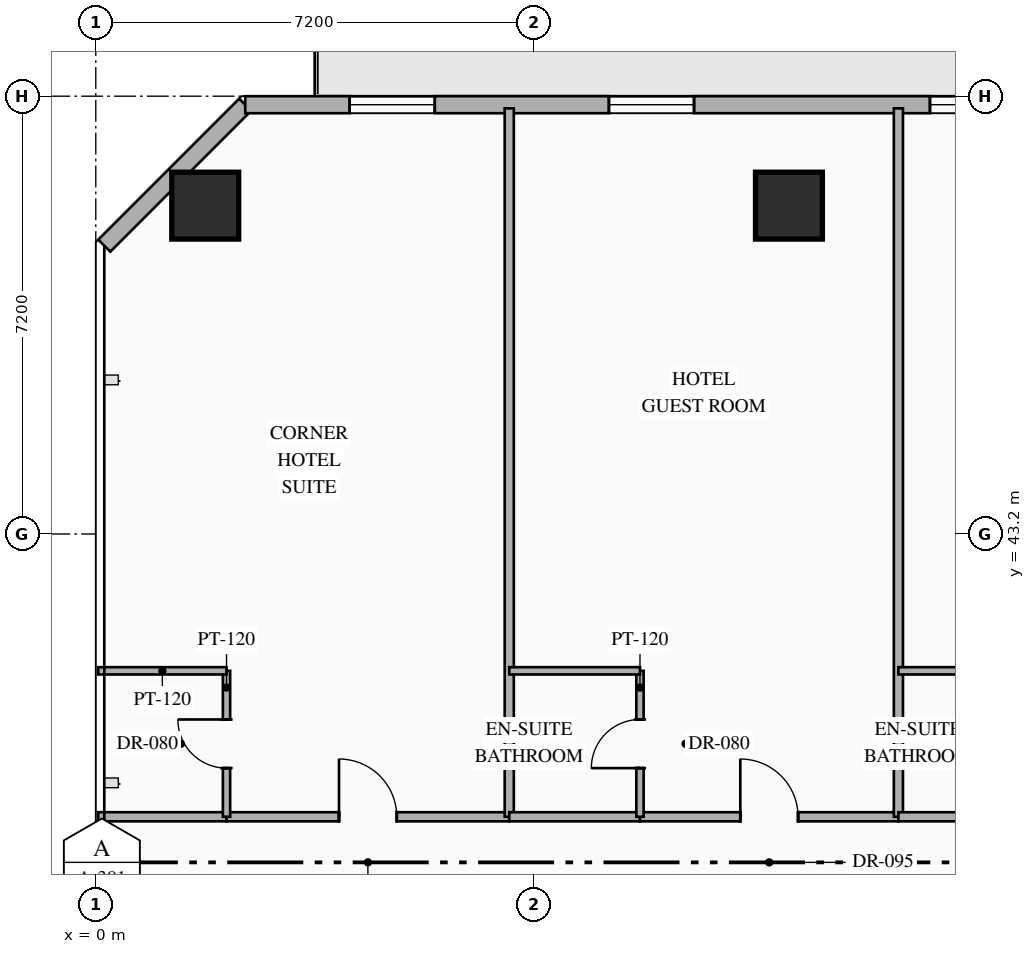
"""IFC4 building model, lengths in metres.
Left out: names, types, materials, properties, quantities, classifications, styles, units other than length and angle.
Written with IfcOpenShell. Run it as: python <this file> out.ifc"""

import sys

from ifc_helpers import new_model, si_unit, direction, frame, frame_2d, origin, origin_2d, place, context, subcontext, project, spatial, rectangle, hollow_rectangle, extrude, element, fill, save


model = new_model("IFC4")
c1 = context("Model", 3, precision=1e-05, world=origin(), true_north=direction((0.0, 1.0)))
c2 = subcontext(c1, "Body", "Model", "MODEL_VIEW")
j1 = project(units=[si_unit("LENGTHUNIT", "METRE"), si_unit("PLANEANGLEUNIT", "RADIAN")], contexts=[c1])
p1 = place(None, origin())
s1 = spatial("IfcSite", under=j1, at=p1, CompositionType="ELEMENT")
p2 = place(p1, origin())
s2 = spatial("IfcBuilding", under=s1, at=p2, CompositionType="ELEMENT")
p3 = place(p2, frame((0.0, 0.0, 50.0)))
s3 = spatial("IfcBuildingStorey", under=s2, at=p3, CompositionType="ELEMENT", Elevation=50.0)
for number, where, z_axis, x_axis in (
    (1, (1.8, 48.6, 0.0), (0.0, 0.0, 1.0), (1.0, 0.0, 0.0)),
    (2, (11.4, 48.6, 0.0), (0.0, 0.0, 1.0), (1.0, 0.0, 0.0)),
):
    element("IfcColumn", number, at=place(p3, frame(where, z_axis=z_axis, x_axis=x_axis)), inside=s3, PredefinedType="COLUMN", context=c2, shape_type="SweptSolid", body=[
        extrude(hollow_rectangle(XDim=1.1, YDim=1.1, WallThickness=0.04, at=origin_2d()), origin(), (0.0, 0.0, 1.0), 3.35),
    ])
p4 = place(p3, frame((0.14, 47.942, 0.0), z_axis=(0.0, 0.0, 1.0), x_axis=(0.707106781187, 0.707106781187, 0.0)))
e3 = element("IfcWall", 3, at=p4, inside=s3, PredefinedType="STANDARD", context=c2, shape_type="SweptSolid", body=[
    extrude(rectangle(XDim=3.278, YDim=0.28, at=frame_2d((1.639, 0.0))), origin(), (0.0, 0.0, 1.0), 3.13),
])
p5 = place(p3, frame((2.458, 50.26, 0.0), z_axis=(0.0, 0.0, 1.0), x_axis=(1.0, 0.0, 0.0)))
e4 = element("IfcWall", 4, at=p5, inside=s3, PredefinedType="STANDARD", context=c2, shape_type="SweptSolid", body=[
    extrude(rectangle(XDim=40.084, YDim=0.28, at=frame_2d((20.042, 0.0))), origin(), (0.0, 0.0, 1.0), 3.13),
])
p6 = place(p5, frame((25.905, 0.0, 0.0)))
e5 = element("IfcOpeningElement", 5, at=p6, cuts=e4, PredefinedType="OPENING", context=c2, shape_type="SweptSolid", body=[
    extrude(rectangle(XDim=1.1, YDim=2.2, at=frame_2d((0.55, 1.1))), frame((0.0, 0.15, 0.0), z_axis=(0.0, -1.0, 0.0), x_axis=(1.0, 0.0, 0.0)), (0.0, 0.0, 1.0), 0.3),
])
p7 = place(p5, frame((1.717, 0.0, 0.85)))
e6 = element("IfcOpeningElement", 6, at=p7, cuts=e4, PredefinedType="OPENING", context=c2, shape_type="SweptSolid", body=[
    extrude(rectangle(XDim=1.4, YDim=1.8, at=frame_2d((0.7, 0.9))), frame((0.0, 0.15, 0.0), z_axis=(0.0, -1.0, 0.0), x_axis=(1.0, 0.0, 0.0)), (0.0, 0.0, 1.0), 0.3),
])
p8 = place(p5, frame((5.981, 0.0, 0.85)))
e7 = element("IfcOpeningElement", 7, at=p8, cuts=e4, PredefinedType="OPENING", context=c2, shape_type="SweptSolid", body=[
    extrude(rectangle(XDim=1.4, YDim=1.8, at=frame_2d((0.7, 0.9))), frame((0.0, 0.15, 0.0), z_axis=(0.0, -1.0, 0.0), x_axis=(1.0, 0.0, 0.0)), (0.0, 0.0, 1.0), 0.3),
])
p9 = place(p5, frame((11.261, 0.0, 0.85)))
e8 = element("IfcOpeningElement", 8, at=p9, cuts=e4, PredefinedType="OPENING", context=c2, shape_type="SweptSolid", body=[
    extrude(rectangle(XDim=1.4, YDim=1.8, at=frame_2d((0.7, 0.9))), frame((0.0, 0.15, 0.0), z_axis=(0.0, -1.0, 0.0), x_axis=(1.0, 0.0, 0.0)), (0.0, 0.0, 1.0), 0.3),
])
p10 = place(p5, frame((14.02, 0.0, 0.85)))
e9 = element("IfcOpeningElement", 9, at=p10, cuts=e4, PredefinedType="OPENING", context=c2, shape_type="SweptSolid", body=[
    extrude(rectangle(XDim=1.4, YDim=1.8, at=frame_2d((0.7, 0.9))), frame((0.0, 0.15, 0.0), z_axis=(0.0, -1.0, 0.0), x_axis=(1.0, 0.0, 0.0)), (0.0, 0.0, 1.0), 0.3),
])
p11 = place(p5, frame((20.789, 0.0, 0.85)))
e10 = element("IfcOpeningElement", 10, at=p11, cuts=e4, PredefinedType="OPENING", context=c2, shape_type="SweptSolid", body=[
    extrude(rectangle(XDim=1.4, YDim=1.8, at=frame_2d((0.7, 0.9))), frame((0.0, 0.15, 0.0), z_axis=(0.0, -1.0, 0.0), x_axis=(1.0, 0.0, 0.0)), (0.0, 0.0, 1.0), 0.3),
])
p12 = place(p5, frame((32.703, 0.0, 0.85)))
e11 = element("IfcOpeningElement", 11, at=p12, cuts=e4, PredefinedType="OPENING", context=c2, shape_type="SweptSolid", body=[
    extrude(rectangle(XDim=1.4, YDim=1.8, at=frame_2d((0.7, 0.9))), frame((0.0, 0.15, 0.0), z_axis=(0.0, -1.0, 0.0), x_axis=(1.0, 0.0, 0.0)), (0.0, 0.0, 1.0), 0.3),
])
p13 = place(p5, frame((36.967, 0.0, 0.85)))
e12 = element("IfcOpeningElement", 12, at=p13, cuts=e4, PredefinedType="OPENING", context=c2, shape_type="SweptSolid", body=[
    extrude(rectangle(XDim=1.4, YDim=1.8, at=frame_2d((0.7, 0.9))), frame((0.0, 0.15, 0.0), z_axis=(0.0, -1.0, 0.0), x_axis=(1.0, 0.0, 0.0)), (0.0, 0.0, 1.0), 0.3),
])
p14 = place(p3, frame((0.04, 38.55, 0.0), z_axis=(0.0, 0.0, 1.0), x_axis=(1.0, 0.0, 0.0)))
e13 = element("IfcWall", 13, at=p14, inside=s3, PredefinedType="PARTITIONING", context=c2, shape_type="SweptSolid", body=[
    extrude(rectangle(XDim=2.11, YDim=0.15, at=frame_2d((1.055, 0.0))), origin(), (0.0, 0.0, 1.0), 2.775),
])
p15 = place(p3, frame((2.15, 38.55, 0.0), z_axis=(0.0, 0.0, 1.0), x_axis=(1.0, 0.0, 0.0)))
e14 = element("IfcWall", 14, at=p15, inside=s3, PredefinedType="PARTITIONING", context=c2, shape_type="SweptSolid", body=[
    extrude(rectangle(XDim=4.65, YDim=0.15, at=frame_2d((2.325, 0.0))), origin(), (0.0, 0.0, 1.0), 2.775),
])
p16 = place(p15, frame((1.85, 0.0, 0.0)))
e15 = element("IfcOpeningElement", 15, at=p16, cuts=e14, PredefinedType="OPENING", context=c2, shape_type="SweptSolid", body=[
    extrude(rectangle(XDim=0.95, YDim=2.15, at=frame_2d((0.475, 1.075))), frame((0.0, 0.085, 0.0), z_axis=(0.0, -1.0, 0.0), x_axis=(1.0, 0.0, 0.0)), (0.0, 0.0, 1.0), 0.17),
])
p17 = place(p3, frame((2.15, 38.55, 0.0), z_axis=(0.0, 0.0, 1.0), x_axis=(0.0, 1.0, 0.0)))
e16 = element("IfcWall", 16, at=p17, inside=s3, PredefinedType="PARTITIONING", context=c2, shape_type="SweptSolid", body=[
    extrude(rectangle(XDim=2.4, YDim=0.12, at=frame_2d((1.2, 0.0))), origin(), (0.0, 0.0, 1.0), 3.13),
])
p18 = place(p17, frame((0.8, 0.0, 0.0)))
e17 = element("IfcOpeningElement", 17, at=p18, cuts=e16, PredefinedType="OPENING", context=c2, shape_type="SweptSolid", body=[
    extrude(rectangle(XDim=0.8, YDim=2.06, at=frame_2d((0.4, 1.03))), frame((0.0, 0.07, 0.0), z_axis=(0.0, -1.0, 0.0), x_axis=(1.0, 0.0, 0.0)), (0.0, 0.0, 1.0), 0.14),
])
p19 = place(p3, frame((0.04, 40.95, 0.0), z_axis=(0.0, 0.0, 1.0), x_axis=(1.0, 0.0, 0.0)))
e18 = element("IfcWall", 18, at=p19, inside=s3, PredefinedType="PARTITIONING", context=c2, shape_type="SweptSolid", body=[
    extrude(rectangle(XDim=2.11, YDim=0.12, at=frame_2d((1.055, 0.0))), origin(), (0.0, 0.0, 1.0), 2.775),
])
p20 = place(p3, frame((6.8, 38.55, 0.0), z_axis=(0.0, 0.0, 1.0), x_axis=(0.0, 1.0, 0.0)))
e19 = element("IfcWall", 19, at=p20, inside=s3, PredefinedType="PARTITIONING", context=c2, shape_type="SweptSolid", body=[
    extrude(rectangle(XDim=11.65, YDim=0.15, at=frame_2d((5.825, 0.0))), origin(), (0.0, 0.0, 1.0), 3.13),
])
p21 = place(p3, frame((6.8, 38.55, 0.0), z_axis=(0.0, 0.0, 1.0), x_axis=(1.0, 0.0, 0.0)))
e20 = element("IfcWall", 20, at=p21, inside=s3, PredefinedType="PARTITIONING", context=c2, shape_type="SweptSolid", body=[
    extrude(rectangle(XDim=2.15, YDim=0.15, at=frame_2d((1.075, 0.0))), origin(), (0.0, 0.0, 1.0), 2.775),
])
p22 = place(p3, frame((8.95, 38.55, 0.0), z_axis=(0.0, 0.0, 1.0), x_axis=(1.0, 0.0, 0.0)))
e21 = element("IfcWall", 21, at=p22, inside=s3, PredefinedType="PARTITIONING", context=c2, shape_type="SweptSolid", body=[
    extrude(rectangle(XDim=4.25, YDim=0.15, at=frame_2d((2.125, 0.0))), origin(), (0.0, 0.0, 1.0), 2.775),
])
p23 = place(p22, frame((1.65, 0.0, 0.0)))
e22 = element("IfcOpeningElement", 22, at=p23, cuts=e21, PredefinedType="OPENING", context=c2, shape_type="SweptSolid", body=[
    extrude(rectangle(XDim=0.95, YDim=2.15, at=frame_2d((0.475, 1.075))), frame((0.0, 0.085, 0.0), z_axis=(0.0, -1.0, 0.0), x_axis=(1.0, 0.0, 0.0)), (0.0, 0.0, 1.0), 0.17),
])
p24 = place(p3, frame((8.95, 38.55, 0.0), z_axis=(0.0, 0.0, 1.0), x_axis=(0.0, 1.0, 0.0)))
e23 = element("IfcWall", 23, at=p24, inside=s3, PredefinedType="PARTITIONING", context=c2, shape_type="SweptSolid", body=[
    extrude(rectangle(XDim=2.4, YDim=0.12, at=frame_2d((1.2, 0.0))), origin(), (0.0, 0.0, 1.0), 3.13),
])
p25 = place(p24, frame((0.8, 0.0, 0.0)))
e24 = element("IfcOpeningElement", 24, at=p25, cuts=e23, PredefinedType="OPENING", context=c2, shape_type="SweptSolid", body=[
    extrude(rectangle(XDim=0.8, YDim=2.06, at=frame_2d((0.4, 1.03))), frame((0.0, 0.07, 0.0), z_axis=(0.0, -1.0, 0.0), x_axis=(1.0, 0.0, 0.0)), (0.0, 0.0, 1.0), 0.14),
])
p26 = place(p3, frame((6.8, 40.95, 0.0), z_axis=(0.0, 0.0, 1.0), x_axis=(1.0, 0.0, 0.0)))
e25 = element("IfcWall", 25, at=p26, inside=s3, PredefinedType="PARTITIONING", context=c2, shape_type="SweptSolid", body=[
    extrude(rectangle(XDim=2.15, YDim=0.12, at=frame_2d((1.075, 0.0))), origin(), (0.0, 0.0, 1.0), 2.775),
])
p27 = place(p3, frame((13.2, 38.55, 0.0), z_axis=(0.0, 0.0, 1.0), x_axis=(0.0, 1.0, 0.0)))
e26 = element("IfcWall", 26, at=p27, inside=s3, PredefinedType="PARTITIONING", context=c2, shape_type="SweptSolid", body=[
    extrude(rectangle(XDim=11.65, YDim=0.15, at=frame_2d((5.825, 0.0))), origin(), (0.0, 0.0, 1.0), 3.13),
])
p28 = place(p3, frame((13.2, 38.55, 0.0), z_axis=(0.0, 0.0, 1.0), x_axis=(1.0, 0.0, 0.0)))
e27 = element("IfcWall", 27, at=p28, inside=s3, PredefinedType="PARTITIONING", context=c2, shape_type="SweptSolid", body=[
    extrude(rectangle(XDim=2.15, YDim=0.15, at=frame_2d((1.075, 0.0))), origin(), (0.0, 0.0, 1.0), 2.775),
])
p29 = place(p3, frame((13.2, 40.95, 0.0), z_axis=(0.0, 0.0, 1.0), x_axis=(1.0, 0.0, 0.0)))
e28 = element("IfcWall", 28, at=p29, inside=s3, PredefinedType="PARTITIONING", context=c2, shape_type="SweptSolid", body=[
    extrude(rectangle(XDim=2.15, YDim=0.12, at=frame_2d((1.075, 0.0))), origin(), (0.0, 0.0, 1.0), 2.775),
])
p30 = place(p7, origin())
e29 = element("IfcWindow", 29, at=p30, inside=s3, PartitioningType="SINGLE_PANEL", PredefinedType="WINDOW", context=c2, shape_type="SweptSolid", body=[
    extrude(rectangle(XDim=1.4, YDim=1.8, at=frame_2d((0.7, 0.9))), frame((0.0, 0.03, 0.0), z_axis=(0.0, -1.0, 0.0), x_axis=(1.0, 0.0, 0.0)), (0.0, 0.0, 1.0), 0.06),
])
fill(e6, e29)
p31 = place(p8, origin())
e30 = element("IfcWindow", 30, at=p31, inside=s3, PartitioningType="SINGLE_PANEL", PredefinedType="WINDOW", context=c2, shape_type="SweptSolid", body=[
    extrude(rectangle(XDim=1.4, YDim=1.8, at=frame_2d((0.7, 0.9))), frame((0.0, 0.03, 0.0), z_axis=(0.0, -1.0, 0.0), x_axis=(1.0, 0.0, 0.0)), (0.0, 0.0, 1.0), 0.06),
])
fill(e7, e30)
p32 = place(p9, origin())
e31 = element("IfcWindow", 31, at=p32, inside=s3, PartitioningType="SINGLE_PANEL", PredefinedType="WINDOW", context=c2, shape_type="SweptSolid", body=[
    extrude(rectangle(XDim=1.4, YDim=1.8, at=frame_2d((0.7, 0.9))), frame((0.0, 0.03, 0.0), z_axis=(0.0, -1.0, 0.0), x_axis=(1.0, 0.0, 0.0)), (0.0, 0.0, 1.0), 0.06),
])
fill(e8, e31)
p33 = place(p16, origin())
e32 = element("IfcDoor", 32, at=p33, inside=s3, OperationType="SINGLE_SWING_LEFT", PredefinedType="DOOR", context=c2, shape_type="SweptSolid", body=[
    extrude(rectangle(XDim=0.95, YDim=2.15, at=frame_2d((0.475, 1.075))), frame((0.0, 0.025, 0.0), z_axis=(0.0, -1.0, 0.0), x_axis=(1.0, 0.0, 0.0)), (0.0, 0.0, 1.0), 0.05),
])
fill(e15, e32)
p34 = place(p18, origin())
e33 = element("IfcDoor", 33, at=p34, inside=s3, OperationType="SINGLE_SWING_RIGHT", PredefinedType="DOOR", context=c2, shape_type="SweptSolid", body=[
    extrude(rectangle(XDim=0.8, YDim=2.06, at=frame_2d((0.4, 1.03))), frame((0.0, 0.025, 0.0), z_axis=(0.0, -1.0, 0.0), x_axis=(1.0, 0.0, 0.0)), (0.0, 0.0, 1.0), 0.05),
])
fill(e17, e33)
p35 = place(p23, origin())
e34 = element("IfcDoor", 34, at=p35, inside=s3, OperationType="SINGLE_SWING_LEFT", PredefinedType="DOOR", context=c2, shape_type="SweptSolid", body=[
    extrude(rectangle(XDim=0.95, YDim=2.15, at=frame_2d((0.475, 1.075))), frame((0.0, 0.025, 0.0), z_axis=(0.0, -1.0, 0.0), x_axis=(1.0, 0.0, 0.0)), (0.0, 0.0, 1.0), 0.05),
])
fill(e22, e34)
p36 = place(p25, origin())
e35 = element("IfcDoor", 35, at=p36, inside=s3, OperationType="SINGLE_SWING_LEFT", PredefinedType="DOOR", context=c2, shape_type="SweptSolid", body=[
    extrude(rectangle(XDim=0.8, YDim=2.06, at=frame_2d((0.4, 1.03))), frame((0.0, 0.025, 0.0), z_axis=(0.0, -1.0, 0.0), x_axis=(1.0, 0.0, 0.0)), (0.0, 0.0, 1.0), 0.05),
])
fill(e24, e35)
save(model, sys.argv[1])
